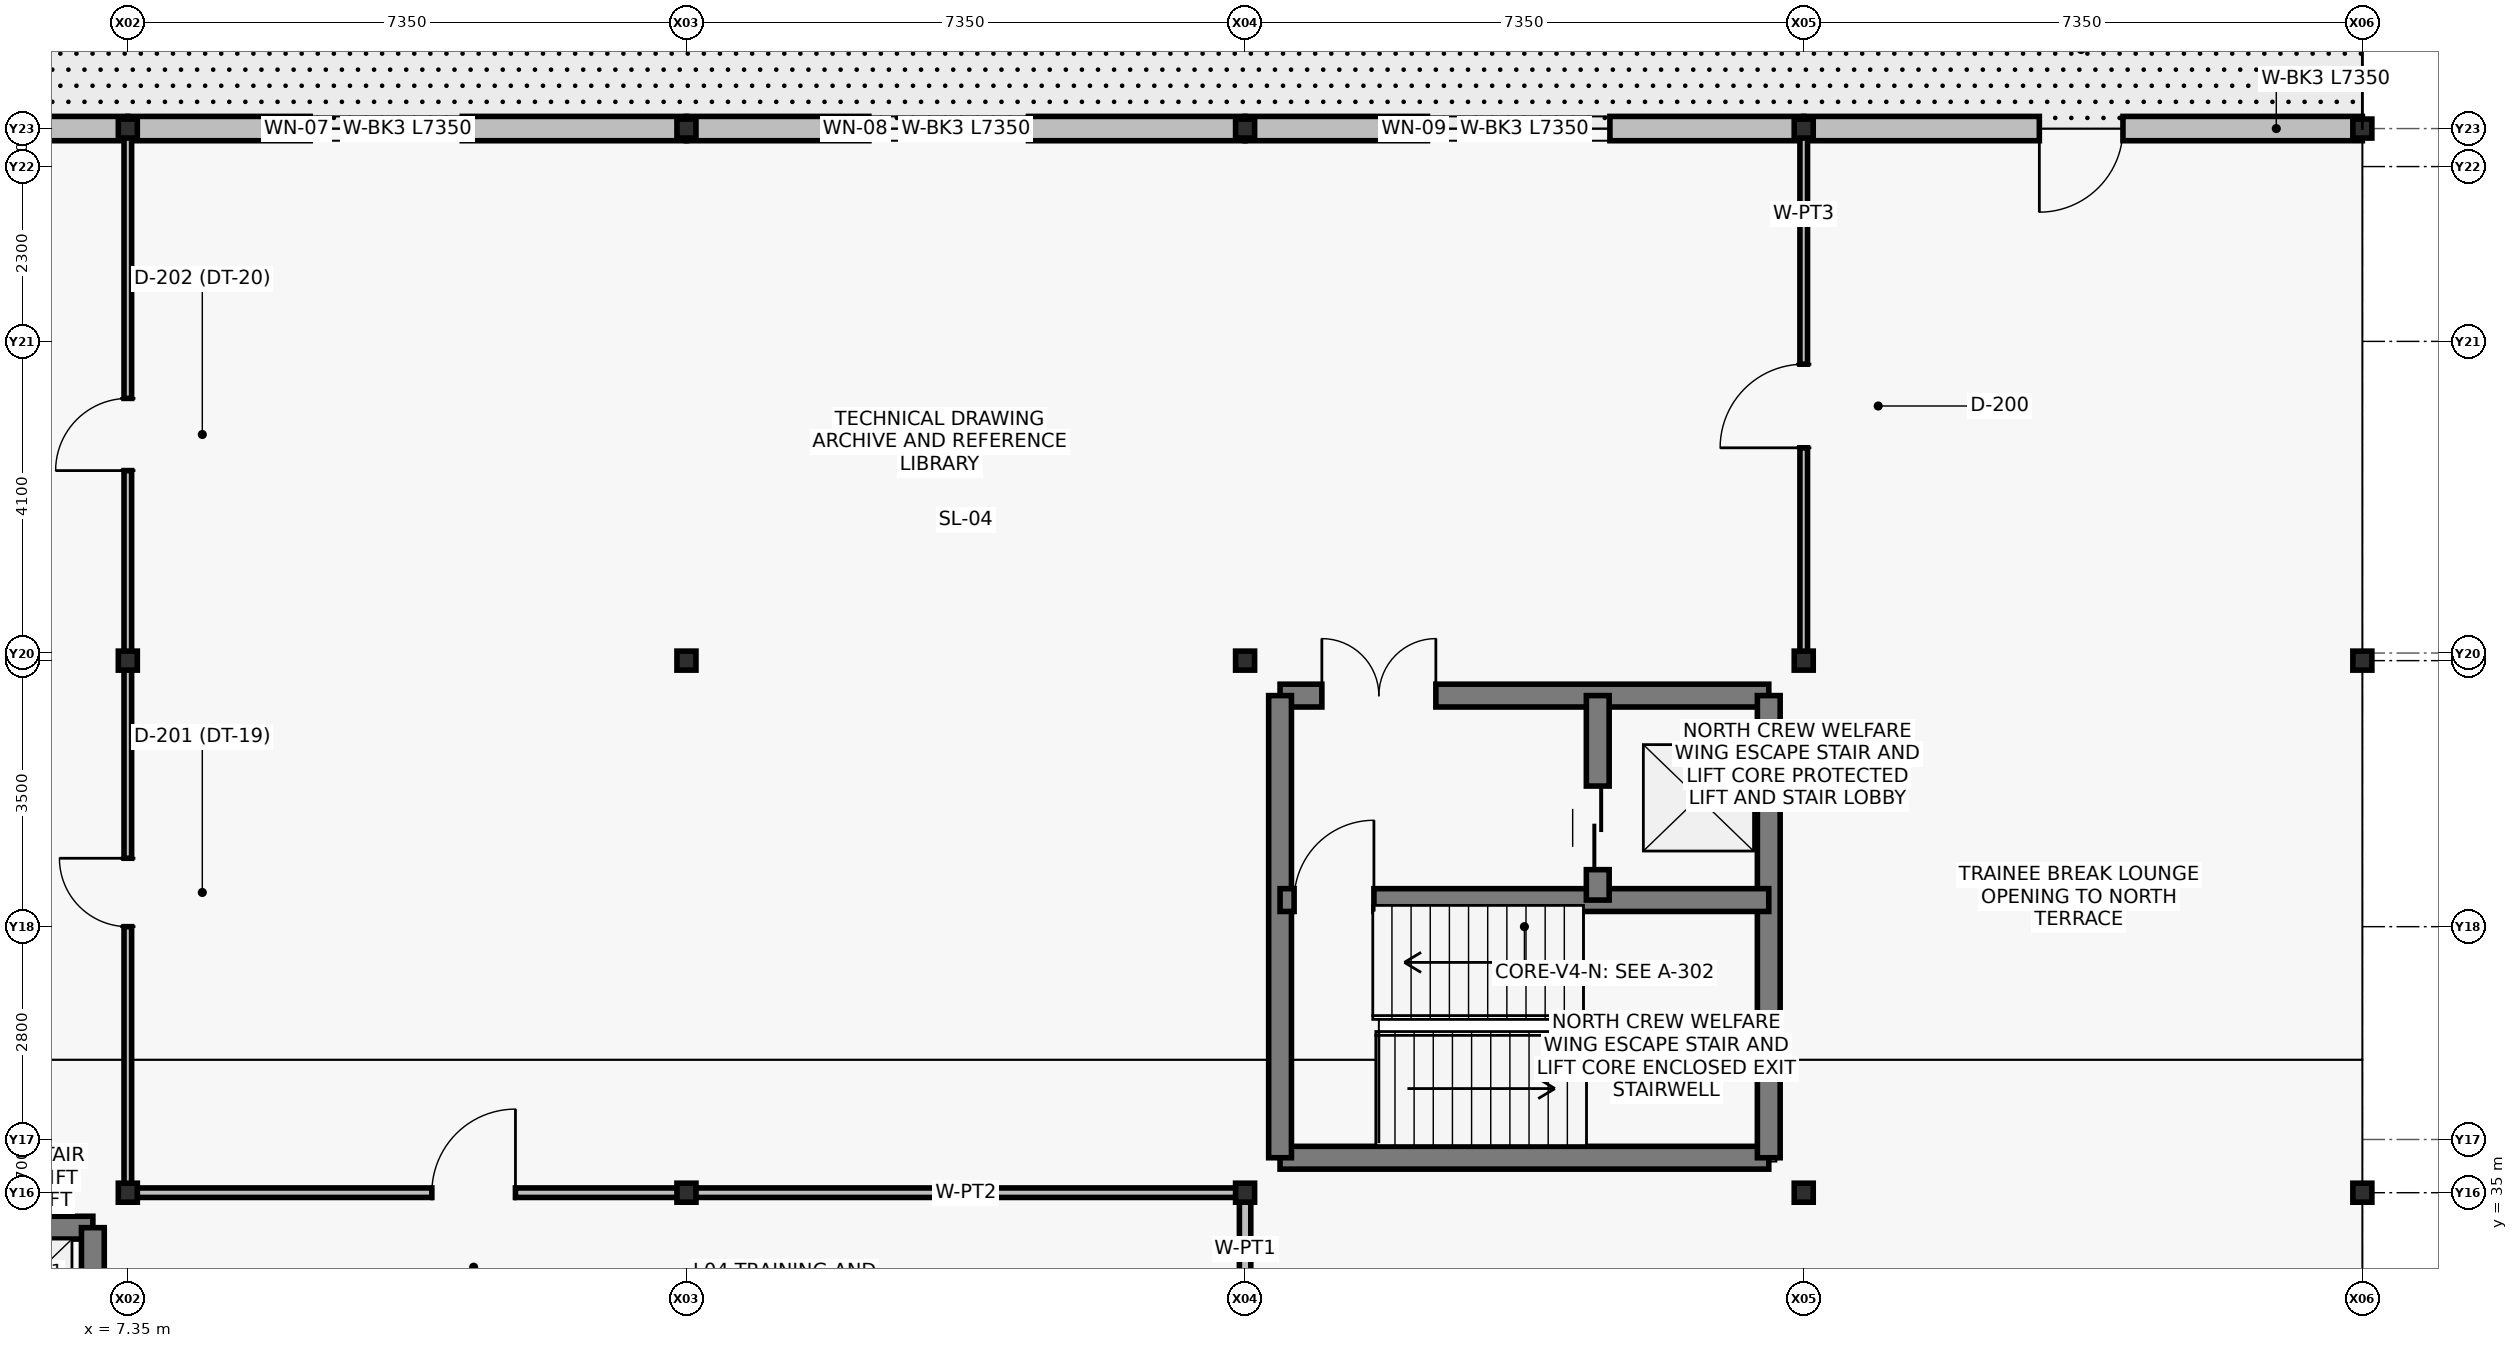
"""IFC4 building model, lengths in metres.
Left out: names, types, materials, properties, quantities, classifications, styles, units other than length and angle.
Written with IfcOpenShell. Run it as: python <this file> out.ifc"""

import sys

from ifc_helpers import new_model, si_unit, direction, frame, frame_2d, origin, origin_2d, place, context, subcontext, project, spatial, rectangle, i_section, extrude, element, fill, save


model = new_model("IFC4")
c1 = context("Model", 3, precision=1e-05, world=origin(), true_north=direction((0.0, 1.0)))
c2 = subcontext(c1, "Body", "Model", "MODEL_VIEW")
j1 = project(units=[si_unit("LENGTHUNIT", "METRE"), si_unit("PLANEANGLEUNIT", "RADIAN")], contexts=[c1])
p1 = place(None, origin())
s1 = spatial("IfcSite", under=j1, at=p1, CompositionType="ELEMENT")
p2 = place(p1, origin())
s2 = spatial("IfcBuilding", under=s1, at=p2, CompositionType="ELEMENT")
p3 = place(p2, frame((0.0, 0.0, 15.3)))
s3 = spatial("IfcBuildingStorey", under=s2, at=p3, CompositionType="ELEMENT", Elevation=15.3)
for number, where, z_axis, x_axis in (
    (1, (7.35, 35.0, 0.0), (0.0, 0.0, 1.0), (1.0, 0.0, 0.0)),
    (2, (7.35, 42.0, 0.0), (0.0, 0.0, 1.0), (1.0, 0.0, 0.0)),
    (3, (7.35, 49.0, 0.0), (0.0, 0.0, 1.0), (1.0, 0.0, 0.0)),
    (4, (14.7, 35.0, 0.0), (0.0, 0.0, 1.0), (1.0, 0.0, 0.0)),
    (5, (14.7, 42.0, 0.0), (0.0, 0.0, 1.0), (1.0, 0.0, 0.0)),
    (6, (14.7, 49.0, 0.0), (0.0, 0.0, 1.0), (1.0, 0.0, 0.0)),
    (7, (22.05, 35.0, 0.0), (0.0, 0.0, 1.0), (1.0, 0.0, 0.0)),
    (8, (22.05, 42.0, 0.0), (0.0, 0.0, 1.0), (1.0, 0.0, 0.0)),
    (9, (22.05, 49.0, 0.0), (0.0, 0.0, 1.0), (1.0, 0.0, 0.0)),
    (10, (29.4, 35.0, 0.0), (0.0, 0.0, 1.0), (1.0, 0.0, 0.0)),
    (11, (29.4, 42.0, 0.0), (0.0, 0.0, 1.0), (1.0, 0.0, 0.0)),
    (12, (29.4, 49.0, 0.0), (0.0, 0.0, 1.0), (1.0, 0.0, 0.0)),
    (13, (36.75, 35.0, 0.0), (0.0, 0.0, 1.0), (1.0, 0.0, 0.0)),
    (14, (36.75, 42.0, 0.0), (0.0, 0.0, 1.0), (1.0, 0.0, 0.0)),
    (15, (36.75, 49.0, 0.0), (0.0, 0.0, 1.0), (1.0, 0.0, 0.0)),
):
    element("IfcColumn", number, at=place(p3, frame(where, z_axis=z_axis, x_axis=x_axis)), inside=s3, PredefinedType="COLUMN", context=c2, shape_type="SweptSolid", body=[
        extrude(i_section(OverallWidth=0.25, OverallDepth=0.25, WebThickness=0.009, FlangeThickness=0.014, at=origin_2d()), origin(), (0.0, 0.0, 1.0), 4.2),
    ])
p4 = place(p3, frame((0.0, 49.0, 0.0), z_axis=(0.0, 0.0, 1.0), x_axis=(1.0, 0.0, 0.0)))
e16 = element("IfcWall", 16, at=p4, inside=s3, PredefinedType="SOLIDWALL", context=c2, shape_type="SweptSolid", body=[
    extrude(rectangle(XDim=7.35, YDim=0.32, at=frame_2d((3.675, 0.0))), origin(), (0.0, 0.0, 1.0), 3.45),
])
p5 = place(p4, frame((2.4, 0.0, 0.9)))
e17 = element("IfcOpeningElement", 17, at=p5, cuts=e16, PredefinedType="OPENING", context=c2, shape_type="SweptSolid", body=[
    extrude(rectangle(XDim=1.8, YDim=2.1, at=frame_2d((0.9, 1.05))), frame((0.0, 0.17, 0.0), z_axis=(0.0, -1.0, 0.0), x_axis=(1.0, 0.0, 0.0)), (0.0, 0.0, 1.0), 0.34),
])
p6 = place(p3, frame((7.35, 49.0, 0.0), z_axis=(0.0, 0.0, 1.0), x_axis=(1.0, 0.0, 0.0)))
e18 = element("IfcWall", 18, at=p6, inside=s3, PredefinedType="SOLIDWALL", context=c2, shape_type="SweptSolid", body=[
    extrude(rectangle(XDim=7.35, YDim=0.32, at=frame_2d((3.675, 0.0))), origin(), (0.0, 0.0, 1.0), 3.45),
])
p7 = place(p6, frame((2.4, 0.0, 0.9)))
e19 = element("IfcOpeningElement", 19, at=p7, cuts=e18, PredefinedType="OPENING", context=c2, shape_type="SweptSolid", body=[
    extrude(rectangle(XDim=2.0, YDim=1.8, at=frame_2d((1.0, 0.9))), frame((0.0, 0.17, 0.0), z_axis=(0.0, -1.0, 0.0), x_axis=(1.0, 0.0, 0.0)), (0.0, 0.0, 1.0), 0.34),
])
p8 = place(p3, frame((14.7, 49.0, 0.0), z_axis=(0.0, 0.0, 1.0), x_axis=(1.0, 0.0, 0.0)))
e20 = element("IfcWall", 20, at=p8, inside=s3, PredefinedType="SOLIDWALL", context=c2, shape_type="SweptSolid", body=[
    extrude(rectangle(XDim=7.35, YDim=0.32, at=frame_2d((3.675, 0.0))), origin(), (0.0, 0.0, 1.0), 3.45),
])
p9 = place(p8, frame((2.4, 0.0, 0.9)))
e21 = element("IfcOpeningElement", 21, at=p9, cuts=e20, PredefinedType="OPENING", context=c2, shape_type="SweptSolid", body=[
    extrude(rectangle(XDim=2.1, YDim=2.1, at=frame_2d((1.05, 1.05))), frame((0.0, 0.17, 0.0), z_axis=(0.0, -1.0, 0.0), x_axis=(1.0, 0.0, 0.0)), (0.0, 0.0, 1.0), 0.34),
])
p10 = place(p3, frame((22.05, 49.0, 0.0), z_axis=(0.0, 0.0, 1.0), x_axis=(1.0, 0.0, 0.0)))
e22 = element("IfcWall", 22, at=p10, inside=s3, PredefinedType="SOLIDWALL", context=c2, shape_type="SweptSolid", body=[
    extrude(rectangle(XDim=7.35, YDim=0.32, at=frame_2d((3.675, 0.0))), origin(), (0.0, 0.0, 1.0), 3.45),
])
p11 = place(p10, frame((2.4, 0.0, 0.9)))
e23 = element("IfcOpeningElement", 23, at=p11, cuts=e22, PredefinedType="OPENING", context=c2, shape_type="SweptSolid", body=[
    extrude(rectangle(XDim=2.4, YDim=1.8, at=frame_2d((1.2, 0.9))), frame((0.0, 0.17, 0.0), z_axis=(0.0, -1.0, 0.0), x_axis=(1.0, 0.0, 0.0)), (0.0, 0.0, 1.0), 0.34),
])
p12 = place(p3, frame((29.4, 49.0, 0.0), z_axis=(0.0, 0.0, 1.0), x_axis=(1.0, 0.0, 0.0)))
e24 = element("IfcWall", 24, at=p12, inside=s3, PredefinedType="SOLIDWALL", context=c2, shape_type="SweptSolid", body=[
    extrude(rectangle(XDim=7.35, YDim=0.32, at=frame_2d((3.675, 0.0))), origin(), (0.0, 0.0, 1.0), 3.45),
])
p13 = place(p12, frame((3.1, 0.0, 0.0)))
e25 = element("IfcOpeningElement", 25, at=p13, cuts=e24, PredefinedType="OPENING", context=c2, shape_type="SweptSolid", body=[
    extrude(rectangle(XDim=1.1, YDim=2.2, at=frame_2d((0.55, 1.1))), frame((0.0, 0.17, 0.0), z_axis=(0.0, -1.0, 0.0), x_axis=(1.0, 0.0, 0.0)), (0.0, 0.0, 1.0), 0.34),
])
p14 = place(p3, frame((0.46, 34.54, 0.0), z_axis=(0.0, 0.0, 1.0), x_axis=(1.0, 0.0, 0.0)))
e26 = element("IfcWall", 26, at=p14, inside=s3, PredefinedType="SHEAR", context=c2, shape_type="SweptSolid", body=[
    extrude(rectangle(XDim=6.43, YDim=0.3, at=frame_2d((3.215, 0.0))), origin(), (0.0, 0.0, 1.0), 3.92),
])
p15 = place(p14, frame((0.55, 0.0, 0.0)))
e27 = element("IfcOpeningElement", 27, at=p15, cuts=e26, PredefinedType="OPENING", context=c2, shape_type="SweptSolid", body=[
    extrude(rectangle(XDim=1.5, YDim=2.2, at=frame_2d((0.75, 1.1))), frame((0.0, 0.16, 0.0), z_axis=(0.0, -1.0, 0.0), x_axis=(1.0, 0.0, 0.0)), (0.0, 0.0, 1.0), 0.32),
])
p16 = place(p3, frame((6.89, 28.46, 0.0), z_axis=(0.0, 0.0, 1.0), x_axis=(0.0, 1.0, 0.0)))
e28 = element("IfcWall", 28, at=p16, inside=s3, PredefinedType="SHEAR", context=c2, shape_type="SweptSolid", body=[
    extrude(rectangle(XDim=6.08, YDim=0.3, at=frame_2d((3.04, 0.0))), origin(), (0.0, 0.0, 1.0), 3.92),
])
p17 = place(p3, frame((22.51, 35.46, 0.0), z_axis=(0.0, 0.0, 1.0), x_axis=(1.0, 0.0, 0.0)))
e29 = element("IfcWall", 29, at=p17, inside=s3, PredefinedType="SHEAR", context=c2, shape_type="SweptSolid", body=[
    extrude(rectangle(XDim=6.43, YDim=0.3, at=frame_2d((3.215, 0.0))), origin(), (0.0, 0.0, 1.0), 3.92),
])
p18 = place(p3, frame((22.51, 41.54, 0.0), z_axis=(0.0, 0.0, 1.0), x_axis=(1.0, 0.0, 0.0)))
e30 = element("IfcWall", 30, at=p18, inside=s3, PredefinedType="SHEAR", context=c2, shape_type="SweptSolid", body=[
    extrude(rectangle(XDim=6.43, YDim=0.3, at=frame_2d((3.215, 0.0))), origin(), (0.0, 0.0, 1.0), 3.92),
])
p19 = place(p18, frame((0.55, 0.0, 0.0)))
e31 = element("IfcOpeningElement", 31, at=p19, cuts=e30, PredefinedType="OPENING", context=c2, shape_type="SweptSolid", body=[
    extrude(rectangle(XDim=1.5, YDim=2.2, at=frame_2d((0.75, 1.1))), frame((0.0, 0.16, 0.0), z_axis=(0.0, -1.0, 0.0), x_axis=(1.0, 0.0, 0.0)), (0.0, 0.0, 1.0), 0.32),
])
for number, where, z_axis, x_axis in (
    (32, (22.51, 35.46, 0.0), (0.0, 0.0, 1.0), (0.0, 1.0, 0.0)),
    (33, (28.94, 35.46, 0.0), (0.0, 0.0, 1.0), (0.0, 1.0, 0.0)),
):
    element("IfcWall", number, at=place(p3, frame(where, z_axis=z_axis, x_axis=x_axis)), inside=s3, PredefinedType="SHEAR", context=c2, shape_type="SweptSolid", body=[
        extrude(rectangle(XDim=6.08, YDim=0.3, at=frame_2d((3.04, 0.0))), origin(), (0.0, 0.0, 1.0), 3.92),
    ])
p20 = place(p3, frame((22.51, 38.85, 0.0), z_axis=(0.0, 0.0, 1.0), x_axis=(1.0, 0.0, 0.0)))
e34 = element("IfcWall", 34, at=p20, inside=s3, PredefinedType="SHEAR", context=c2, shape_type="SweptSolid", body=[
    extrude(rectangle(XDim=6.43, YDim=0.3, at=frame_2d((3.215, 0.0))), origin(), (0.0, 0.0, 1.0), 3.92),
])
p21 = place(p20, frame((0.185, 0.0, 0.0)))
e35 = element("IfcOpeningElement", 35, at=p21, cuts=e34, PredefinedType="OPENING", context=c2, shape_type="SweptSolid", body=[
    extrude(rectangle(XDim=1.05, YDim=2.15, at=frame_2d((0.525, 1.075))), frame((0.0, 0.16, 0.0), z_axis=(0.0, -1.0, 0.0), x_axis=(1.0, 0.0, 0.0)), (0.0, 0.0, 1.0), 0.32),
])
p22 = place(p3, frame((26.69, 38.85, 0.0), z_axis=(0.0, 0.0, 1.0), x_axis=(0.0, 1.0, 0.0)))
e36 = element("IfcWall", 36, at=p22, inside=s3, PredefinedType="SHEAR", context=c2, shape_type="SweptSolid", body=[
    extrude(rectangle(XDim=2.69, YDim=0.3, at=frame_2d((1.345, 0.0))), origin(), (0.0, 0.0, 1.0), 3.92),
])
p23 = place(p22, frame((0.4, 0.0, 0.0)))
e37 = element("IfcOpeningElement", 37, at=p23, cuts=e36, PredefinedType="OPENING", context=c2, shape_type="SweptSolid", body=[
    extrude(rectangle(XDim=1.1, YDim=2.15, at=frame_2d((0.55, 1.075))), frame((0.0, 0.16, 0.0), z_axis=(0.0, -1.0, 0.0), x_axis=(1.0, 0.0, 0.0)), (0.0, 0.0, 1.0), 0.32),
])
p24 = place(p3, frame((22.05, 14.0, 0.0), z_axis=(0.0, 0.0, 1.0), x_axis=(0.0, 1.0, 0.0)))
e38 = element("IfcWall", 38, at=p24, inside=s3, PredefinedType="PARTITIONING", context=c2, shape_type="SweptSolid", body=[
    extrude(rectangle(XDim=21.0, YDim=0.15, at=frame_2d((10.5, 0.0))), origin(), (0.0, 0.0, 1.0), 3.2),
])
p25 = place(p24, frame((4.0, 0.0, 0.0)))
e39 = element("IfcOpeningElement", 39, at=p25, cuts=e38, PredefinedType="OPENING", context=c2, shape_type="SweptSolid", body=[
    extrude(rectangle(XDim=1.25, YDim=2.15, at=frame_2d((0.625, 1.075))), frame((0.0, 0.085, 0.0), z_axis=(0.0, -1.0, 0.0), x_axis=(1.0, 0.0, 0.0)), (0.0, 0.0, 1.0), 0.17),
])
p26 = place(p24, frame((17.5, 0.0, 0.0)))
e40 = element("IfcOpeningElement", 40, at=p26, cuts=e38, PredefinedType="OPENING", context=c2, shape_type="SweptSolid", body=[
    extrude(rectangle(XDim=1.15, YDim=2.15, at=frame_2d((0.575, 1.075))), frame((0.0, 0.085, 0.0), z_axis=(0.0, -1.0, 0.0), x_axis=(1.0, 0.0, 0.0)), (0.0, 0.0, 1.0), 0.17),
])
p27 = place(p3, frame((7.35, 35.0, 0.0), z_axis=(0.0, 0.0, 1.0), x_axis=(1.0, 0.0, 0.0)))
e41 = element("IfcWall", 41, at=p27, inside=s3, PredefinedType="PARTITIONING", context=c2, shape_type="SweptSolid", body=[
    extrude(rectangle(XDim=14.7, YDim=0.125, at=frame_2d((7.35, 0.0))), origin(), (0.0, 0.0, 1.0), 3.2),
])
p28 = place(p27, frame((4.0, 0.0, 0.0)))
e42 = element("IfcOpeningElement", 42, at=p28, cuts=e41, PredefinedType="OPENING", context=c2, shape_type="SweptSolid", body=[
    extrude(rectangle(XDim=1.1, YDim=2.1, at=frame_2d((0.55, 1.05))), frame((0.0, 0.072, 0.0), z_axis=(0.0, -1.0, 0.0), x_axis=(1.0, 0.0, 0.0)), (0.0, 0.0, 1.0), 0.145),
])
p29 = place(p3, frame((29.4, 42.0, 0.0), z_axis=(0.0, 0.0, 1.0), x_axis=(0.0, 1.0, 0.0)))
e43 = element("IfcWall", 43, at=p29, inside=s3, PredefinedType="PARTITIONING", context=c2, shape_type="SweptSolid", body=[
    extrude(rectangle(XDim=7.0, YDim=0.1, at=frame_2d((3.5, 0.0))), origin(), (0.0, 0.0, 1.0), 3.2),
])
p30 = place(p29, frame((2.8, 0.0, 0.0)))
e44 = element("IfcOpeningElement", 44, at=p30, cuts=e43, PredefinedType="OPENING", context=c2, shape_type="SweptSolid", body=[
    extrude(rectangle(XDim=1.1, YDim=2.1, at=frame_2d((0.55, 1.05))), frame((0.0, 0.06, 0.0), z_axis=(0.0, -1.0, 0.0), x_axis=(1.0, 0.0, 0.0)), (0.0, 0.0, 1.0), 0.12),
])
p31 = place(p3, frame((7.35, 35.0, 0.0), z_axis=(0.0, 0.0, 1.0), x_axis=(0.0, 1.0, 0.0)))
e45 = element("IfcWall", 45, at=p31, inside=s3, PredefinedType="PARTITIONING", context=c2, shape_type="SweptSolid", body=[
    extrude(rectangle(XDim=14.0, YDim=0.1, at=frame_2d((7.0, 0.0))), origin(), (0.0, 0.0, 1.0), 3.2),
])
p32 = place(p31, frame((3.5, 0.0, 0.0)))
e46 = element("IfcOpeningElement", 46, at=p32, cuts=e45, PredefinedType="OPENING", context=c2, shape_type="SweptSolid", body=[
    extrude(rectangle(XDim=0.9, YDim=2.1, at=frame_2d((0.45, 1.05))), frame((0.0, 0.06, 0.0), z_axis=(0.0, -1.0, 0.0), x_axis=(1.0, 0.0, 0.0)), (0.0, 0.0, 1.0), 0.12),
])
p33 = place(p31, frame((9.5, 0.0, 0.0)))
e47 = element("IfcOpeningElement", 47, at=p33, cuts=e45, PredefinedType="OPENING", context=c2, shape_type="SweptSolid", body=[
    extrude(rectangle(XDim=0.95, YDim=2.2, at=frame_2d((0.475, 1.1))), frame((0.0, 0.06, 0.0), z_axis=(0.0, -1.0, 0.0), x_axis=(1.0, 0.0, 0.0)), (0.0, 0.0, 1.0), 0.12),
])
p34 = place(p7, origin())
e48 = element("IfcWindow", 48, at=p34, inside=s3, PartitioningType="SINGLE_PANEL", PredefinedType="WINDOW", context=c2, shape_type="SweptSolid", body=[
    extrude(rectangle(XDim=2.0, YDim=1.8, at=frame_2d((1.0, 0.9))), frame((0.0, 0.03, 0.0), z_axis=(0.0, -1.0, 0.0), x_axis=(1.0, 0.0, 0.0)), (0.0, 0.0, 1.0), 0.06),
])
fill(e19, e48)
p35 = place(p9, origin())
e49 = element("IfcWindow", 49, at=p35, inside=s3, PartitioningType="SINGLE_PANEL", PredefinedType="WINDOW", context=c2, shape_type="SweptSolid", body=[
    extrude(rectangle(XDim=2.1, YDim=2.1, at=frame_2d((1.05, 1.05))), frame((0.0, 0.03, 0.0), z_axis=(0.0, -1.0, 0.0), x_axis=(1.0, 0.0, 0.0)), (0.0, 0.0, 1.0), 0.06),
])
fill(e21, e49)
p36 = place(p11, origin())
e50 = element("IfcWindow", 50, at=p36, inside=s3, PartitioningType="SINGLE_PANEL", PredefinedType="WINDOW", context=c2, shape_type="SweptSolid", body=[
    extrude(rectangle(XDim=2.4, YDim=1.8, at=frame_2d((1.2, 0.9))), frame((0.0, 0.03, 0.0), z_axis=(0.0, -1.0, 0.0), x_axis=(1.0, 0.0, 0.0)), (0.0, 0.0, 1.0), 0.06),
])
fill(e23, e50)
p37 = place(p13, origin())
e51 = element("IfcDoor", 51, at=p37, inside=s3, OperationType="SINGLE_SWING_LEFT", PredefinedType="DOOR", context=c2, shape_type="SweptSolid", body=[
    extrude(rectangle(XDim=1.1, YDim=2.2, at=frame_2d((0.55, 1.1))), frame((0.0, 0.025, 0.0), z_axis=(0.0, -1.0, 0.0), x_axis=(1.0, 0.0, 0.0)), (0.0, 0.0, 1.0), 0.05),
])
fill(e25, e51)
p38 = place(p21, origin())
e52 = element("IfcDoor", 52, at=p38, inside=s3, OperationType="SINGLE_SWING_RIGHT", PredefinedType="DOOR", context=c2, shape_type="SweptSolid", body=[
    extrude(rectangle(XDim=1.05, YDim=2.15, at=frame_2d((0.525, 1.075))), frame((0.0, 0.025, 0.0), z_axis=(0.0, -1.0, 0.0), x_axis=(1.0, 0.0, 0.0)), (0.0, 0.0, 1.0), 0.05),
])
fill(e35, e52)
p39 = place(p19, origin())
e53 = element("IfcDoor", 53, at=p39, inside=s3, OperationType="DOUBLE_DOOR_SINGLE_SWING", PredefinedType="DOOR", context=c2, shape_type="SweptSolid", body=[
    extrude(rectangle(XDim=1.5, YDim=2.2, at=frame_2d((0.75, 1.1))), frame((0.0, 0.025, 0.0), z_axis=(0.0, -1.0, 0.0), x_axis=(1.0, 0.0, 0.0)), (0.0, 0.0, 1.0), 0.05),
])
fill(e31, e53)
p40 = place(p23, origin())
e54 = element("IfcDoor", 54, at=p40, inside=s3, OperationType="SLIDING_TO_RIGHT", PredefinedType="DOOR", context=c2, shape_type="SweptSolid", body=[
    extrude(rectangle(XDim=1.1, YDim=2.15, at=frame_2d((0.55, 1.075))), frame((0.0, 0.025, 0.0), z_axis=(0.0, -1.0, 0.0), x_axis=(1.0, 0.0, 0.0)), (0.0, 0.0, 1.0), 0.05),
])
fill(e37, e54)
p41 = place(p28, origin())
e55 = element("IfcDoor", 55, at=p41, inside=s3, OperationType="SINGLE_SWING_RIGHT", PredefinedType="DOOR", context=c2, shape_type="SweptSolid", body=[
    extrude(rectangle(XDim=1.1, YDim=2.1, at=frame_2d((0.55, 1.05))), frame((0.0, 0.025, 0.0), z_axis=(0.0, -1.0, 0.0), x_axis=(1.0, 0.0, 0.0)), (0.0, 0.0, 1.0), 0.05),
])
fill(e42, e55)
p42 = place(p30, origin())
e56 = element("IfcDoor", 56, at=p42, inside=s3, OperationType="SINGLE_SWING_LEFT", PredefinedType="DOOR", context=c2, shape_type="SweptSolid", body=[
    extrude(rectangle(XDim=1.1, YDim=2.1, at=frame_2d((0.55, 1.05))), frame((0.0, 0.025, 0.0), z_axis=(0.0, -1.0, 0.0), x_axis=(1.0, 0.0, 0.0)), (0.0, 0.0, 1.0), 0.05),
])
fill(e44, e56)
p43 = place(p32, origin())
e57 = element("IfcDoor", 57, at=p43, inside=s3, OperationType="SINGLE_SWING_RIGHT", PredefinedType="DOOR", context=c2, shape_type="SweptSolid", body=[
    extrude(rectangle(XDim=0.9, YDim=2.1, at=frame_2d((0.45, 1.05))), frame((0.0, 0.025, 0.0), z_axis=(0.0, -1.0, 0.0), x_axis=(1.0, 0.0, 0.0)), (0.0, 0.0, 1.0), 0.05),
])
fill(e46, e57)
p44 = place(p33, origin())
e58 = element("IfcDoor", 58, at=p44, inside=s3, OperationType="SINGLE_SWING_LEFT", PredefinedType="DOOR", context=c2, shape_type="SweptSolid", body=[
    extrude(rectangle(XDim=0.95, YDim=2.2, at=frame_2d((0.475, 1.1))), frame((0.0, 0.025, 0.0), z_axis=(0.0, -1.0, 0.0), x_axis=(1.0, 0.0, 0.0)), (0.0, 0.0, 1.0), 0.05),
])
fill(e47, e58)
save(model, sys.argv[1])
